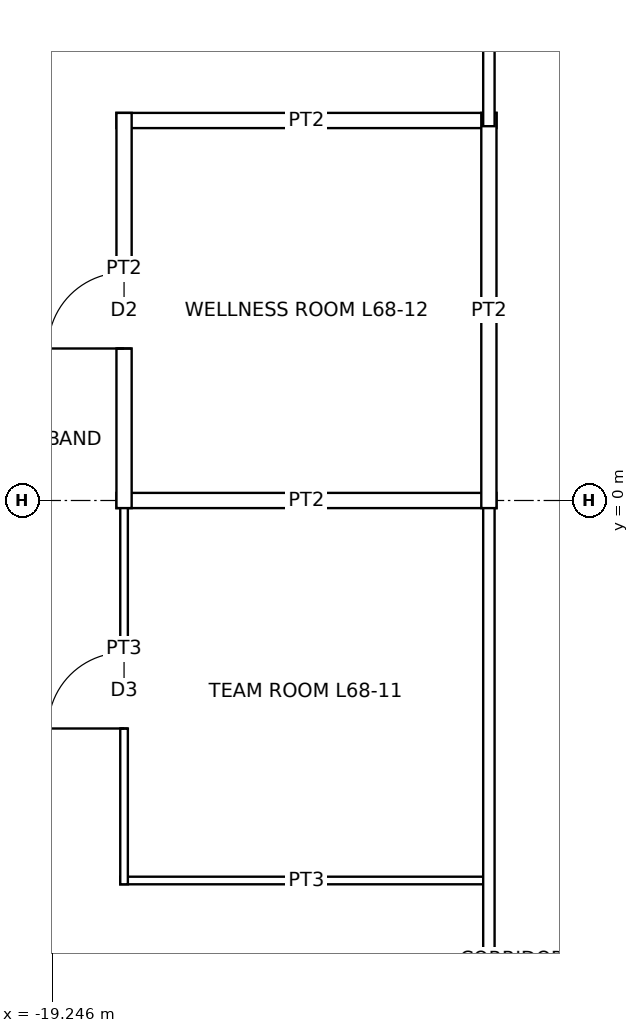
"""IFC4 building model, lengths in metres.
Left out: names, types, materials, properties, quantities, classifications, styles, units other than length and angle.
Written with IfcOpenShell. Run it as: python <this file> out.ifc"""

import sys

from ifc_helpers import new_model, si_unit, direction, frame, frame_2d, origin, place, context, subcontext, project, spatial, rectangle, extrude, element, fill, save


model = new_model("IFC4")
c1 = context("Model", 3, precision=1e-05, world=origin(), true_north=direction((0.0, 1.0)))
c2 = subcontext(c1, "Body", "Model", "MODEL_VIEW")
j1 = project(units=[si_unit("LENGTHUNIT", "METRE"), si_unit("PLANEANGLEUNIT", "RADIAN")], contexts=[c1])
p1 = place(None, origin())
s1 = spatial("IfcSite", under=j1, at=p1, CompositionType="ELEMENT")
p2 = place(p1, origin())
s2 = spatial("IfcBuilding", under=s1, at=p2, CompositionType="ELEMENT")
p3 = place(p2, frame((0.0, 0.0, 307.9)))
s3 = spatial("IfcBuildingStorey", under=s2, at=p3, CompositionType="ELEMENT", Elevation=307.9)
p4 = place(p3, frame((-18.35, -5.0, 0.0), z_axis=(0.0, 0.0, 1.0), x_axis=(1.0, 0.0, 0.0)))
e1 = element("IfcWall", 1, at=p4, inside=s3, PredefinedType="PARTITIONING", context=c2, shape_type="SweptSolid", body=[
    extrude(rectangle(XDim=4.9, YDim=0.1, at=frame_2d((2.45, 0.0))), origin(), (0.0, 0.0, 1.0), 3.85),
])
p5 = place(p3, frame((-18.4, 0.0, 0.0), z_axis=(0.0, 0.0, 1.0), x_axis=(1.0, 0.0, 0.0)))
e2 = element("IfcWall", 2, at=p5, inside=s3, PredefinedType="PARTITIONING", context=c2, shape_type="SweptSolid", body=[
    extrude(rectangle(XDim=5.0, YDim=0.2, at=frame_2d((2.5, 0.0))), origin(), (0.0, 0.0, 1.0), 3.243),
])
p6 = place(p3, frame((-18.4, 5.0, 0.0), z_axis=(0.0, 0.0, 1.0), x_axis=(1.0, 0.0, 0.0)))
e3 = element("IfcWall", 3, at=p6, inside=s3, PredefinedType="PARTITIONING", context=c2, shape_type="SweptSolid", body=[
    extrude(rectangle(XDim=5.0, YDim=0.2, at=frame_2d((2.5, 0.0))), origin(), (0.0, 0.0, 1.0), 3.85),
])
p7 = place(p3, frame((-18.3, -5.05, 0.0), z_axis=(0.0, 0.0, 1.0), x_axis=(0.0, 1.0, 0.0)))
e4 = element("IfcWall", 4, at=p7, inside=s3, PredefinedType="PARTITIONING", context=c2, shape_type="SweptSolid", body=[
    extrude(rectangle(XDim=5.1, YDim=0.1, at=frame_2d((2.55, 0.0))), origin(), (0.0, 0.0, 1.0), 3.85),
])
p8 = place(p7, frame((2.05, 0.0, 0.0)))
e5 = element("IfcOpeningElement", 5, at=p8, cuts=e4, PredefinedType="OPENING", context=c2, shape_type="SweptSolid", body=[
    extrude(rectangle(XDim=1.0, YDim=2.1, at=frame_2d((0.5, 1.05))), frame((0.0, 0.06, 0.0), z_axis=(0.0, -1.0, 0.0), x_axis=(1.0, 0.0, 0.0)), (0.0, 0.0, 1.0), 0.12),
])
p9 = place(p3, frame((-18.3, -0.1, 0.0), z_axis=(0.0, 0.0, 1.0), x_axis=(0.0, 1.0, 0.0)))
e6 = element("IfcWall", 6, at=p9, inside=s3, PredefinedType="PARTITIONING", context=c2, shape_type="SweptSolid", body=[
    extrude(rectangle(XDim=5.2, YDim=0.2, at=frame_2d((2.6, 0.0))), origin(), (0.0, 0.0, 1.0), 3.85),
])
p10 = place(p9, frame((2.1, 0.0, 0.0)))
e7 = element("IfcOpeningElement", 7, at=p10, cuts=e6, PredefinedType="OPENING", context=c2, shape_type="SweptSolid", body=[
    extrude(rectangle(XDim=1.0, YDim=2.1, at=frame_2d((0.5, 1.05))), frame((0.0, 0.11, 0.0), z_axis=(0.0, -1.0, 0.0), x_axis=(1.0, 0.0, 0.0)), (0.0, 0.0, 1.0), 0.22),
])
p11 = place(p3, frame((-13.5, -13.575, 0.0), z_axis=(0.0, 0.0, 1.0), x_axis=(0.0, 1.0, 0.0)))
e8 = element("IfcWall", 8, at=p11, inside=s3, PredefinedType="PARTITIONING", context=c2, shape_type="SweptSolid", body=[
    extrude(rectangle(XDim=13.65, YDim=0.15, at=frame_2d((6.825, 0.0))), origin(), (0.0, 0.0, 1.0), 3.85),
])
p12 = place(p3, frame((-13.5, -0.1, 0.0), z_axis=(0.0, 0.0, 1.0), x_axis=(0.0, 1.0, 0.0)))
e9 = element("IfcWall", 9, at=p12, inside=s3, PredefinedType="PARTITIONING", context=c2, shape_type="SweptSolid", body=[
    extrude(rectangle(XDim=5.2, YDim=0.2, at=frame_2d((2.6, 0.0))), origin(), (0.0, 0.0, 1.0), 3.85),
])
p13 = place(p3, frame((-13.5, 4.925, 0.0), z_axis=(0.0, 0.0, 1.0), x_axis=(0.0, 1.0, 0.0)))
e10 = element("IfcWall", 10, at=p13, inside=s3, PredefinedType="PARTITIONING", context=c2, shape_type="SweptSolid", body=[
    extrude(rectangle(XDim=7.15, YDim=0.15, at=frame_2d((3.575, 0.0))), origin(), (0.0, 0.0, 1.0), 3.85),
])
p14 = place(p8, origin())
e11 = element("IfcDoor", 11, at=p14, inside=s3, OperationType="SINGLE_SWING_LEFT", PredefinedType="DOOR", context=c2, shape_type="SweptSolid", body=[
    extrude(rectangle(XDim=1.0, YDim=2.1, at=frame_2d((0.5, 1.05))), frame((0.0, 0.025, 0.0), z_axis=(0.0, -1.0, 0.0), x_axis=(1.0, 0.0, 0.0)), (0.0, 0.0, 1.0), 0.05),
])
fill(e5, e11)
p15 = place(p10, origin())
e12 = element("IfcDoor", 12, at=p15, inside=s3, OperationType="SINGLE_SWING_LEFT", PredefinedType="DOOR", context=c2, shape_type="SweptSolid", body=[
    extrude(rectangle(XDim=1.0, YDim=2.1, at=frame_2d((0.5, 1.05))), frame((0.0, 0.025, 0.0), z_axis=(0.0, -1.0, 0.0), x_axis=(1.0, 0.0, 0.0)), (0.0, 0.0, 1.0), 0.05),
])
fill(e7, e12)
save(model, sys.argv[1])
